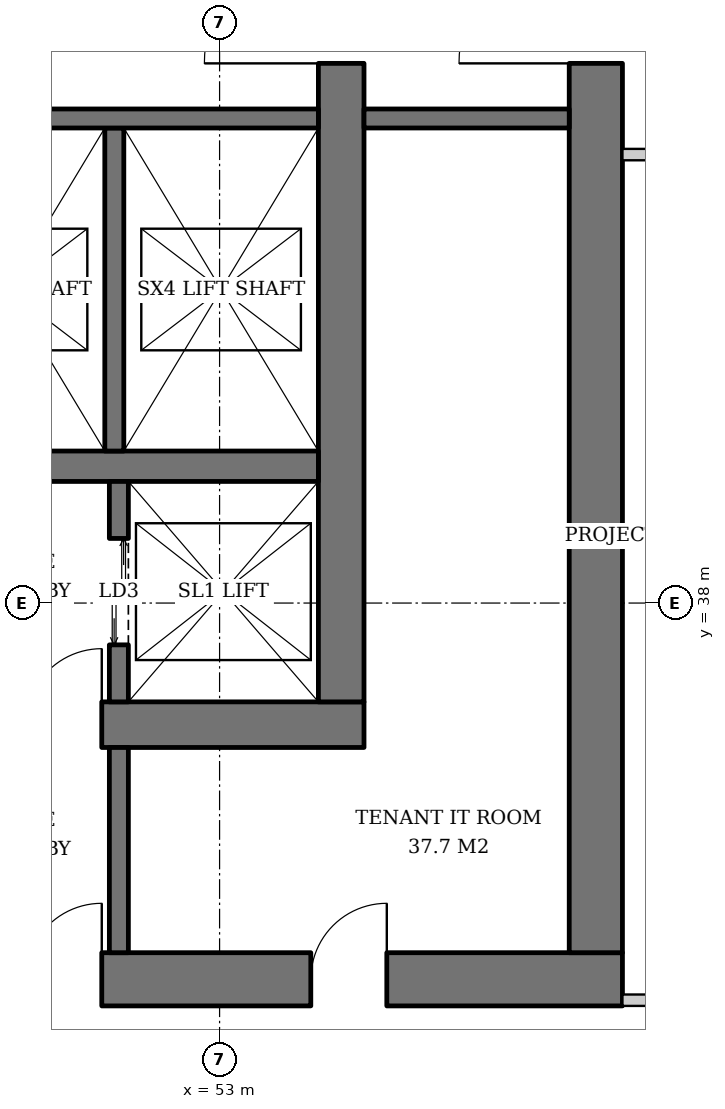
"""IFC4 building model, lengths in metres.
Left out: names, types, materials, properties, quantities, classifications, styles, units other than length and angle.
Written with IfcOpenShell. Run it as: python <this file> out.ifc"""

import sys

from ifc_helpers import new_model, si_unit, direction, frame, frame_2d, origin, place, context, subcontext, project, spatial, rectangle, extrude, element, fill, save


model = new_model("IFC4")
c1 = context("Model", 3, precision=1e-05, world=origin(), true_north=direction((0.0, 1.0)))
c2 = subcontext(c1, "Body", "Model", "MODEL_VIEW")
j1 = project(units=[si_unit("LENGTHUNIT", "METRE"), si_unit("PLANEANGLEUNIT", "RADIAN")], contexts=[c1])
p1 = place(None, origin())
s1 = spatial("IfcSite", under=j1, at=p1, CompositionType="ELEMENT")
p2 = place(p1, origin())
s2 = spatial("IfcBuilding", under=s1, at=p2, CompositionType="ELEMENT")
p3 = place(p2, frame((0.0, 0.0, 154.0)))
s3 = spatial("IfcBuildingStorey", under=s2, at=p3, CompositionType="ELEMENT", Elevation=154.0)
p4 = place(p3, frame((35.1, 36.4, 0.0), z_axis=(0.0, 0.0, 1.0), x_axis=(1.0, 0.0, 0.0)))
e1 = element("IfcWall", 1, at=p4, inside=s3, PredefinedType="SHEAR", context=c2, shape_type="SweptSolid", body=[
    extrude(rectangle(XDim=19.8, YDim=0.6, at=frame_2d((9.9, 0.0))), origin(), (0.0, 0.0, 1.0), 3.8),
])
p5 = place(p4, frame((3.9, 0.0, 0.0)))
e2 = element("IfcOpeningElement", 2, at=p5, cuts=e1, PredefinedType="OPENING", context=c2, shape_type="SweptSolid", body=[
    extrude(rectangle(XDim=1.0, YDim=2.1, at=frame_2d((0.5, 1.05))), frame((0.0, 0.31, 0.0), z_axis=(0.0, -1.0, 0.0), x_axis=(1.0, 0.0, 0.0)), (0.0, 0.0, 1.0), 0.62),
])
p6 = place(p4, frame((15.35, 0.0, 0.0)))
e3 = element("IfcOpeningElement", 3, at=p6, cuts=e1, PredefinedType="OPENING", context=c2, shape_type="SweptSolid", body=[
    extrude(rectangle(XDim=1.0, YDim=2.1, at=frame_2d((0.5, 1.05))), frame((0.0, 0.31, 0.0), z_axis=(0.0, -1.0, 0.0), x_axis=(1.0, 0.0, 0.0)), (0.0, 0.0, 1.0), 0.62),
])
p7 = place(p3, frame((54.6, 36.7, 0.0), z_axis=(0.0, 0.0, 1.0), x_axis=(0.0, 1.0, 0.0)))
e4 = element("IfcWall", 4, at=p7, inside=s3, PredefinedType="SHEAR", context=c2, shape_type="SweptSolid", body=[
    extrude(rectangle(XDim=18.6, YDim=0.6, at=frame_2d((9.3, 0.0))), origin(), (0.0, 0.0, 1.0), 3.8),
])
p8 = place(p7, frame((8.4, 0.0, 0.0)))
e5 = element("IfcOpeningElement", 5, at=p8, cuts=e4, PredefinedType="OPENING", context=c2, shape_type="SweptSolid", body=[
    extrude(rectangle(XDim=1.8, YDim=2.4, at=frame_2d((0.9, 1.2))), frame((0.0, 0.31, 0.0), z_axis=(0.0, -1.0, 0.0), x_axis=(1.0, 0.0, 0.0)), (0.0, 0.0, 1.0), 0.62),
])
p9 = place(p3, frame((31.7, 33.05, 0.0), z_axis=(0.0, 0.0, 1.0), x_axis=(1.0, 0.0, 0.0)))
e6 = element("IfcWall", 6, at=p9, inside=s3, PredefinedType="SHEAR", context=c2, shape_type="SweptSolid", body=[
    extrude(rectangle(XDim=26.6, YDim=0.7, at=frame_2d((13.3, 0.0))), origin(), (0.0, 0.0, 1.0), 3.8),
])
p10 = place(p9, frame((7.3, 0.0, 0.0)))
e7 = element("IfcOpeningElement", 7, at=p10, cuts=e6, PredefinedType="OPENING", context=c2, shape_type="SweptSolid", body=[
    extrude(rectangle(XDim=1.0, YDim=2.1, at=frame_2d((0.5, 1.05))), frame((0.0, 0.36, 0.0), z_axis=(0.0, -1.0, 0.0), x_axis=(1.0, 0.0, 0.0)), (0.0, 0.0, 1.0), 0.72),
])
p11 = place(p9, frame((18.75, 0.0, 0.0)))
e8 = element("IfcOpeningElement", 8, at=p11, cuts=e6, PredefinedType="OPENING", context=c2, shape_type="SweptSolid", body=[
    extrude(rectangle(XDim=1.0, YDim=2.1, at=frame_2d((0.5, 1.05))), frame((0.0, 0.36, 0.0), z_axis=(0.0, -1.0, 0.0), x_axis=(1.0, 0.0, 0.0)), (0.0, 0.0, 1.0), 0.72),
])
p12 = place(p9, frame((3.2, 0.0, 0.0)))
e9 = element("IfcOpeningElement", 9, at=p12, cuts=e6, PredefinedType="OPENING", context=c2, shape_type="SweptSolid", body=[
    extrude(rectangle(XDim=1.0, YDim=2.1, at=frame_2d((0.5, 1.05))), frame((0.0, 0.36, 0.0), z_axis=(0.0, -1.0, 0.0), x_axis=(1.0, 0.0, 0.0)), (0.0, 0.0, 1.0), 0.72),
])
p13 = place(p9, frame((10.42, 0.0, 0.0)))
e10 = element("IfcOpeningElement", 10, at=p13, cuts=e6, PredefinedType="OPENING", context=c2, shape_type="SweptSolid", body=[
    extrude(rectangle(XDim=1.0, YDim=2.1, at=frame_2d((0.5, 1.05))), frame((0.0, 0.36, 0.0), z_axis=(0.0, -1.0, 0.0), x_axis=(1.0, 0.0, 0.0)), (0.0, 0.0, 1.0), 0.72),
])
p14 = place(p9, frame((14.46, 0.0, 0.0)))
e11 = element("IfcOpeningElement", 11, at=p14, cuts=e6, PredefinedType="OPENING", context=c2, shape_type="SweptSolid", body=[
    extrude(rectangle(XDim=1.0, YDim=2.1, at=frame_2d((0.5, 1.05))), frame((0.0, 0.36, 0.0), z_axis=(0.0, -1.0, 0.0), x_axis=(1.0, 0.0, 0.0)), (0.0, 0.0, 1.0), 0.72),
])
p15 = place(p9, frame((22.5, 0.0, 0.0)))
e12 = element("IfcOpeningElement", 12, at=p15, cuts=e6, PredefinedType="OPENING", context=c2, shape_type="SweptSolid", body=[
    extrude(rectangle(XDim=1.0, YDim=2.1, at=frame_2d((0.5, 1.05))), frame((0.0, 0.36, 0.0), z_axis=(0.0, -1.0, 0.0), x_axis=(1.0, 0.0, 0.0)), (0.0, 0.0, 1.0), 0.72),
])
p16 = place(p3, frame((57.95, 33.4, 0.0), z_axis=(0.0, 0.0, 1.0), x_axis=(0.0, 1.0, 0.0)))
e13 = element("IfcWall", 13, at=p16, inside=s3, PredefinedType="SHEAR", context=c2, shape_type="SweptSolid", body=[
    extrude(rectangle(XDim=25.2, YDim=0.7, at=frame_2d((12.6, 0.0))), origin(), (0.0, 0.0, 1.0), 3.8),
])
p17 = place(p16, frame((11.7, 0.0, 0.0)))
e14 = element("IfcOpeningElement", 14, at=p17, cuts=e13, PredefinedType="OPENING", context=c2, shape_type="SweptSolid", body=[
    extrude(rectangle(XDim=1.8, YDim=2.4, at=frame_2d((0.9, 1.2))), frame((0.0, 0.36, 0.0), z_axis=(0.0, -1.0, 0.0), x_axis=(1.0, 0.0, 0.0)), (0.0, 0.0, 1.0), 0.72),
])
p18 = place(p3, frame((35.7, 39.8, 0.0), z_axis=(0.0, 0.0, 1.0), x_axis=(1.0, 0.0, 0.0)))
e15 = element("IfcWall", 15, at=p18, inside=s3, PredefinedType="SHEAR", context=c2, shape_type="SweptSolid", body=[
    extrude(rectangle(XDim=18.6, YDim=0.4, at=frame_2d((9.3, 0.0))), origin(), (0.0, 0.0, 1.0), 3.8),
])
p19 = place(p3, frame((51.675, 36.7, 0.0), z_axis=(0.0, 0.0, 1.0), x_axis=(0.0, 1.0, 0.0)))
e16 = element("IfcWall", 16, at=p19, inside=s3, PredefinedType="SHEAR", context=c2, shape_type="SweptSolid", body=[
    extrude(rectangle(XDim=2.9, YDim=0.25, at=frame_2d((1.45, 0.0))), origin(), (0.0, 0.0, 1.0), 3.8),
])
p20 = place(p19, frame((0.75, 0.0, 0.0)))
e17 = element("IfcOpeningElement", 17, at=p20, cuts=e16, PredefinedType="OPENING", context=c2, shape_type="SweptSolid", body=[
    extrude(rectangle(XDim=1.4, YDim=2.4, at=frame_2d((0.7, 1.2))), frame((0.0, 0.135, 0.0), z_axis=(0.0, -1.0, 0.0), x_axis=(1.0, 0.0, 0.0)), (0.0, 0.0, 1.0), 0.27),
])
p21 = place(p3, frame((51.615, 44.25, 0.0), z_axis=(0.0, 0.0, 1.0), x_axis=(0.0, -1.0, 0.0)))
e18 = element("IfcWall", 18, at=p21, inside=s3, PredefinedType="SHEAR", context=c2, shape_type="SweptSolid", body=[
    extrude(rectangle(XDim=4.25, YDim=0.25, at=frame_2d((2.125, 0.0))), origin(), (0.0, 0.0, 1.0), 3.8),
])
p22 = place(p3, frame((48.93, 44.375, 0.0), z_axis=(0.0, 0.0, 1.0), x_axis=(1.0, 0.0, 0.0)))
e19 = element("IfcWall", 19, at=p22, inside=s3, PredefinedType="SHEAR", context=c2, shape_type="SweptSolid", body=[
    extrude(rectangle(XDim=5.37, YDim=0.25, at=frame_2d((2.685, 0.0))), origin(), (0.0, 0.0, 1.0), 3.8),
])
for number, where, z_axis, x_axis in (
    (20, (54.9, 44.375, 0.0), (0.0, 0.0, 1.0), (1.0, 0.0, 0.0)),
    (21, (51.675, 33.4, 0.0), (0.0, 0.0, 1.0), (0.0, 1.0, 0.0)),
):
    element("IfcWall", number, at=place(p3, frame(where, z_axis=z_axis, x_axis=x_axis)), inside=s3, PredefinedType="SOLIDWALL", context=c2, shape_type="SweptSolid", body=[
        extrude(rectangle(XDim=2.7, YDim=0.25, at=frame_2d((1.35, 0.0))), origin(), (0.0, 0.0, 1.0), 3.52),
    ])
for number, where, z_axis, x_axis in (
    (22, (58.3, 32.775, 0.0), (0.0, 0.0, 1.0), (1.0, 0.0, 0.0)),
    (23, (58.3, 43.9, 0.0), (0.0, 0.0, 1.0), (1.0, 0.0, 0.0)),
):
    element("IfcWall", number, at=place(p3, frame(where, z_axis=z_axis, x_axis=x_axis)), inside=s3, PredefinedType="PARTITIONING", context=c2, shape_type="SweptSolid", body=[
        extrude(rectangle(XDim=1.725, YDim=0.15, at=frame_2d((0.862, 0.0))), origin(), (0.0, 0.0, 1.0), 3.52),
    ])
p23 = place(p20, origin())
e24 = element("IfcDoor", 24, at=p23, inside=s3, OperationType="DOUBLE_DOOR_SLIDING", PredefinedType="DOOR", context=c2, shape_type="SweptSolid", body=[
    extrude(rectangle(XDim=1.4, YDim=2.4, at=frame_2d((0.7, 1.2))), frame((0.0, 0.025, 0.0), z_axis=(0.0, -1.0, 0.0), x_axis=(1.0, 0.0, 0.0)), (0.0, 0.0, 1.0), 0.05),
])
fill(e17, e24)
p24 = place(p8, origin())
e25 = element("IfcDoor", 25, at=p24, inside=s3, OperationType="DOUBLE_DOOR_SINGLE_SWING", PredefinedType="DOOR", context=c2, shape_type="SweptSolid", body=[
    extrude(rectangle(XDim=1.8, YDim=2.4, at=frame_2d((0.9, 1.2))), frame((0.0, 0.025, 0.0), z_axis=(0.0, -1.0, 0.0), x_axis=(1.0, 0.0, 0.0)), (0.0, 0.0, 1.0), 0.05),
])
fill(e5, e25)
p25 = place(p6, origin())
e26 = element("IfcDoor", 26, at=p25, inside=s3, OperationType="SINGLE_SWING_RIGHT", PredefinedType="DOOR", context=c2, shape_type="SweptSolid", body=[
    extrude(rectangle(XDim=1.0, YDim=2.1, at=frame_2d((0.5, 1.05))), frame((0.0, 0.025, 0.0), z_axis=(0.0, -1.0, 0.0), x_axis=(1.0, 0.0, 0.0)), (0.0, 0.0, 1.0), 0.05),
])
fill(e3, e26)
p26 = place(p17, origin())
e27 = element("IfcDoor", 27, at=p26, inside=s3, OperationType="DOUBLE_DOOR_SINGLE_SWING", PredefinedType="DOOR", context=c2, shape_type="SweptSolid", body=[
    extrude(rectangle(XDim=1.8, YDim=2.4, at=frame_2d((0.9, 1.2))), frame((0.0, 0.025, 0.0), z_axis=(0.0, -1.0, 0.0), x_axis=(1.0, 0.0, 0.0)), (0.0, 0.0, 1.0), 0.05),
])
fill(e14, e27)
p27 = place(p11, origin())
e28 = element("IfcDoor", 28, at=p27, inside=s3, OperationType="SINGLE_SWING_RIGHT", PredefinedType="DOOR", context=c2, shape_type="SweptSolid", body=[
    extrude(rectangle(XDim=1.0, YDim=2.1, at=frame_2d((0.5, 1.05))), frame((0.0, 0.025, 0.0), z_axis=(0.0, -1.0, 0.0), x_axis=(1.0, 0.0, 0.0)), (0.0, 0.0, 1.0), 0.05),
])
fill(e8, e28)
p28 = place(p15, origin())
e29 = element("IfcDoor", 29, at=p28, inside=s3, OperationType="SINGLE_SWING_RIGHT", PredefinedType="DOOR", context=c2, shape_type="SweptSolid", body=[
    extrude(rectangle(XDim=1.0, YDim=2.1, at=frame_2d((0.5, 1.05))), frame((0.0, 0.34, 0.0), z_axis=(0.0, -1.0, 0.0), x_axis=(1.0, 0.0, 0.0)), (0.0, 0.0, 1.0), 0.05),
])
fill(e12, e29)
save(model, sys.argv[1])
